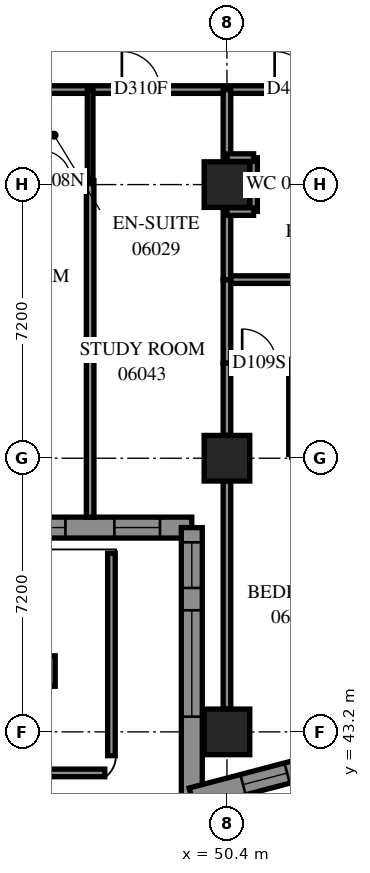
"""IFC4 building model, lengths in metres.
Left out: names, types, materials, properties, quantities, classifications, styles, units other than length and angle.
Written with IfcOpenShell. Run it as: python <this file> out.ifc"""

import sys

from ifc_helpers import new_model, si_unit, direction, frame, frame_2d, origin, origin_2d, place, context, subcontext, project, spatial, polyline, rectangle, outline, extrude, element, fill, save


model = new_model("IFC4")
c1 = context("Model", 3, precision=1e-05, world=origin(), true_north=direction((0.0, 1.0)))
c2 = subcontext(c1, "Body", "Model", "MODEL_VIEW")
j1 = project(units=[si_unit("LENGTHUNIT", "METRE"), si_unit("PLANEANGLEUNIT", "RADIAN")], contexts=[c1])
p1 = place(None, origin())
s1 = spatial("IfcSite", under=j1, at=p1, CompositionType="ELEMENT")
p2 = place(p1, origin())
s2 = spatial("IfcBuilding", under=s1, at=p2, CompositionType="ELEMENT")
p3 = place(p2, frame((0.0, 0.0, 27.0)))
s3 = spatial("IfcBuildingStorey", under=s2, at=p3, CompositionType="ELEMENT", Elevation=27.0)
for number, where, z_axis, x_axis in (
    (1, (50.4, 43.2, 0.0), (0.0, 0.0, 1.0), (1.0, 0.0, 0.0)),
    (2, (50.4, 50.4, 0.0), (0.0, 0.0, 1.0), (1.0, 0.0, 0.0)),
    (3, (50.4, 57.6, 0.0), (0.0, 0.0, 1.0), (1.0, 0.0, 0.0)),
):
    element("IfcColumn", number, at=place(p3, frame(where, z_axis=z_axis, x_axis=x_axis)), inside=s3, PredefinedType="COLUMN", context=c2, shape_type="SweptSolid", body=[
        extrude(rectangle(XDim=1.2, YDim=1.2, at=origin_2d()), origin(), (0.0, 0.0, 1.0), 3.1),
    ])
p4 = place(p3, frame((35.075, 48.575, 0.0), z_axis=(0.0, 0.0, 1.0), x_axis=(1.0, 0.0, 0.0)))
e4 = element("IfcWall", 4, at=p4, inside=s3, PredefinedType="SOLIDWALL", context=c2, shape_type="SweptSolid", body=[
    extrude(outline(polyline([(-0.275, -0.275), (14.125, -0.275), (14.675, 0.275), (0.275, 0.275), (-0.275, -0.275)])), origin(), (0.0, 0.0, 1.0), 3.1),
])
p5 = place(p4, frame((1.325, 0.0, 0.5)))
e5 = element("IfcOpeningElement", 5, at=p5, cuts=e4, PredefinedType="OPENING", context=c2, shape_type="SweptSolid", body=[
    extrude(rectangle(XDim=2.8, YDim=2.45, at=frame_2d((1.4, 1.225))), frame((0.0, 0.285, 0.0), z_axis=(0.0, -1.0, 0.0), x_axis=(1.0, 0.0, 0.0)), (0.0, 0.0, 1.0), 0.57),
])
p6 = place(p4, frame((4.925, 0.0, 0.5)))
e6 = element("IfcOpeningElement", 6, at=p6, cuts=e4, PredefinedType="OPENING", context=c2, shape_type="SweptSolid", body=[
    extrude(rectangle(XDim=2.8, YDim=2.45, at=frame_2d((1.4, 1.225))), frame((0.0, 0.285, 0.0), z_axis=(0.0, -1.0, 0.0), x_axis=(1.0, 0.0, 0.0)), (0.0, 0.0, 1.0), 0.57),
])
p7 = place(p4, frame((8.275, 0.0, 0.5)))
e7 = element("IfcOpeningElement", 7, at=p7, cuts=e4, PredefinedType="OPENING", context=c2, shape_type="SweptSolid", body=[
    extrude(rectangle(XDim=2.8, YDim=2.45, at=frame_2d((1.4, 1.225))), frame((0.0, 0.285, 0.0), z_axis=(0.0, -1.0, 0.0), x_axis=(1.0, 0.0, 0.0)), (0.0, 0.0, 1.0), 0.57),
])
p8 = place(p4, frame((12.363, 0.0, 0.5)))
e8 = element("IfcOpeningElement", 8, at=p8, cuts=e4, PredefinedType="OPENING", context=c2, shape_type="SweptSolid", body=[
    extrude(rectangle(XDim=1.2, YDim=2.45, at=frame_2d((0.6, 1.225))), frame((0.0, 0.285, 0.0), z_axis=(0.0, -1.0, 0.0), x_axis=(1.0, 0.0, 0.0)), (0.0, 0.0, 1.0), 0.57),
])
p9 = place(p3, frame((49.475, 48.575, 0.0), z_axis=(0.0, 0.0, 1.0), x_axis=(0.0, -1.0, 0.0)))
e9 = element("IfcWall", 9, at=p9, inside=s3, PredefinedType="SOLIDWALL", context=c2, shape_type="SweptSolid", body=[
    extrude(outline(polyline([(0.275, -0.275), (7.475, -0.275), (6.762, 0.275), (-0.275, 0.275), (0.275, -0.275)])), origin(), (0.0, 0.0, 1.0), 3.1),
])
p10 = place(p9, frame((2.175, 0.0, 0.5)))
e10 = element("IfcOpeningElement", 10, at=p10, cuts=e9, PredefinedType="OPENING", context=c2, shape_type="SweptSolid", body=[
    extrude(rectangle(XDim=2.8, YDim=2.45, at=frame_2d((1.4, 1.225))), frame((0.0, 0.285, 0.0), z_axis=(0.0, -1.0, 0.0), x_axis=(1.0, 0.0, 0.0)), (0.0, 0.0, 1.0), 0.57),
])
p11 = place(p9, frame((0.388, 0.0, 0.5)))
e11 = element("IfcOpeningElement", 11, at=p11, cuts=e9, PredefinedType="OPENING", context=c2, shape_type="SweptSolid", body=[
    extrude(rectangle(XDim=1.2, YDim=2.45, at=frame_2d((0.6, 1.225))), frame((0.0, 0.285, 0.0), z_axis=(0.0, -1.0, 0.0), x_axis=(1.0, 0.0, 0.0)), (0.0, 0.0, 1.0), 0.57),
])
p12 = place(p3, frame((49.475, 41.457, 0.0), z_axis=(0.0, 0.0, 1.0), x_axis=(0.9671322544, 0.2542738729, 0.0)))
e12 = element("IfcWall", 12, at=p12, inside=s3, PredefinedType="SOLIDWALL", context=c2, shape_type="SweptSolid", body=[
    extrude(outline(polyline([(-0.357, -0.275), (3.183, -0.275), (3.278, 0.275), (0.357, 0.275), (-0.357, -0.275)])), origin(), (0.0, 0.0, 1.0), 3.1),
])
p13 = place(p12, frame((1.393, 0.0, 0.5)))
e13 = element("IfcOpeningElement", 13, at=p13, cuts=e12, PredefinedType="OPENING", context=c2, shape_type="SweptSolid", body=[
    extrude(rectangle(XDim=1.2, YDim=2.45, at=frame_2d((0.6, 1.225))), frame((0.0, 0.285, 0.0), z_axis=(0.0, -1.0, 0.0), x_axis=(1.0, 0.0, 0.0)), (0.0, 0.0, 1.0), 0.57),
])
p14 = place(p3, frame((28.8, 60.1, 0.0), z_axis=(0.0, 0.0, 1.0), x_axis=(1.0, 0.0, 0.0)))
e14 = element("IfcWall", 14, at=p14, inside=s3, PredefinedType="PARTITIONING", context=c2, shape_type="SweptSolid", body=[
    extrude(rectangle(XDim=24.1, YDim=0.2, at=frame_2d((12.05, 0.0))), origin(), (0.0, 0.0, 1.0), 3.1),
])
p15 = place(p14, frame((4.125, 0.0, 0.0)))
e15 = element("IfcOpeningElement", 15, at=p15, cuts=e14, PredefinedType="OPENING", context=c2, shape_type="SweptSolid", body=[
    extrude(rectangle(XDim=1.0, YDim=2.1, at=frame_2d((0.5, 1.05))), frame((0.0, 0.11, 0.0), z_axis=(0.0, -1.0, 0.0), x_axis=(1.0, 0.0, 0.0)), (0.0, 0.0, 1.0), 0.22),
])
p16 = place(p14, frame((11.62, 0.0, 0.0)))
e16 = element("IfcOpeningElement", 16, at=p16, cuts=e14, PredefinedType="OPENING", context=c2, shape_type="SweptSolid", body=[
    extrude(rectangle(XDim=0.9, YDim=2.1, at=frame_2d((0.45, 1.05))), frame((0.0, 0.11, 0.0), z_axis=(0.0, -1.0, 0.0), x_axis=(1.0, 0.0, 0.0)), (0.0, 0.0, 1.0), 0.22),
])
p17 = place(p14, frame((14.8, 0.0, 0.0)))
e17 = element("IfcOpeningElement", 17, at=p17, cuts=e14, PredefinedType="OPENING", context=c2, shape_type="SweptSolid", body=[
    extrude(rectangle(XDim=0.9, YDim=2.1, at=frame_2d((0.45, 1.05))), frame((0.0, 0.11, 0.0), z_axis=(0.0, -1.0, 0.0), x_axis=(1.0, 0.0, 0.0)), (0.0, 0.0, 1.0), 0.22),
])
p18 = place(p14, frame((18.835, 0.0, 0.0)))
e18 = element("IfcOpeningElement", 18, at=p18, cuts=e14, PredefinedType="OPENING", context=c2, shape_type="SweptSolid", body=[
    extrude(rectangle(XDim=1.0, YDim=2.1, at=frame_2d((0.5, 1.05))), frame((0.0, 0.11, 0.0), z_axis=(0.0, -1.0, 0.0), x_axis=(1.0, 0.0, 0.0)), (0.0, 0.0, 1.0), 0.22),
])
p19 = place(p14, frame((22.854, 0.0, 0.0)))
e19 = element("IfcOpeningElement", 19, at=p19, cuts=e14, PredefinedType="OPENING", context=c2, shape_type="SweptSolid", body=[
    extrude(rectangle(XDim=1.0, YDim=2.1, at=frame_2d((0.5, 1.05))), frame((0.0, 0.11, 0.0), z_axis=(0.0, -1.0, 0.0), x_axis=(1.0, 0.0, 0.0)), (0.0, 0.0, 1.0), 0.22),
])
p20 = place(p3, frame((46.8, 48.85, 0.0), z_axis=(0.0, 0.0, 1.0), x_axis=(0.0, 1.0, 0.0)))
e20 = element("IfcWall", 20, at=p20, inside=s3, PredefinedType="PARTITIONING", context=c2, shape_type="SweptSolid", body=[
    extrude(rectangle(XDim=8.85, YDim=0.2, at=frame_2d((4.425, 0.0))), origin(), (0.0, 0.0, 1.0), 3.1),
])
p21 = place(p3, frame((50.4, 43.8, 0.0), z_axis=(0.0, 0.0, 1.0), x_axis=(0.0, 1.0, 0.0)))
e21 = element("IfcWall", 21, at=p21, inside=s3, PredefinedType="PARTITIONING", context=c2, shape_type="SweptSolid", body=[
    extrude(rectangle(XDim=6.0, YDim=0.2, at=frame_2d((3.0, 0.0))), origin(), (0.0, 0.0, 1.0), 2.6),
])
p22 = place(p3, frame((50.4, 52.9, 0.0), z_axis=(0.0, 0.0, 1.0), x_axis=(1.0, 0.0, 0.0)))
e22 = element("IfcWall", 22, at=p22, inside=s3, PredefinedType="PARTITIONING", context=c2, shape_type="SweptSolid", body=[
    extrude(rectangle(XDim=4.1, YDim=0.2, at=frame_2d((2.05, 0.0))), origin(), (0.0, 0.0, 1.0), 3.1),
])
p23 = place(p22, frame((0.4, 0.0, 0.0)))
e23 = element("IfcOpeningElement", 23, at=p23, cuts=e22, PredefinedType="OPENING", context=c2, shape_type="SweptSolid", body=[
    extrude(rectangle(XDim=0.9, YDim=2.1, at=frame_2d((0.45, 1.05))), frame((0.0, 0.11, 0.0), z_axis=(0.0, -1.0, 0.0), x_axis=(1.0, 0.0, 0.0)), (0.0, 0.0, 1.0), 0.22),
])
p24 = place(p3, frame((50.4, 55.1, 0.0), z_axis=(0.0, 0.0, 1.0), x_axis=(1.0, 0.0, 0.0)))
e24 = element("IfcWall", 24, at=p24, inside=s3, PredefinedType="PARTITIONING", context=c2, shape_type="SweptSolid", body=[
    extrude(rectangle(XDim=2.5, YDim=0.2, at=frame_2d((1.25, 0.0))), origin(), (0.0, 0.0, 1.0), 3.1),
])
for number, where, z_axis, x_axis in (
    (25, (46.8, 57.7, 0.0), (0.0, 0.0, 1.0), (0.0, 1.0, 0.0)),
    (26, (52.1, 50.5, 0.0), (0.0, 0.0, 1.0), (0.0, 1.0, 0.0)),
):
    element("IfcWall", number, at=place(p3, frame(where, z_axis=z_axis, x_axis=x_axis)), inside=s3, PredefinedType="PARTITIONING", context=c2, shape_type="SweptSolid", body=[
        extrude(rectangle(XDim=2.4, YDim=0.15, at=frame_2d((1.2, 0.0))), origin(), (0.0, 0.0, 1.0), 3.1),
    ])
p25 = place(p3, frame((50.4, 52.9, 0.0), z_axis=(0.0, 0.0, 1.0), x_axis=(0.0, 1.0, 0.0)))
e27 = element("IfcWall", 27, at=p25, inside=s3, PredefinedType="PARTITIONING", context=c2, shape_type="SweptSolid", body=[
    extrude(rectangle(XDim=2.2, YDim=0.2, at=frame_2d((1.1, 0.0))), origin(), (0.0, 0.0, 1.0), 3.1),
])
p26 = place(p3, frame((44.9, 57.7, 0.0), z_axis=(0.0, 0.0, 1.0), x_axis=(1.0, 0.0, 0.0)))
e28 = element("IfcWall", 28, at=p26, inside=s3, PredefinedType="PARTITIONING", context=c2, shape_type="SweptSolid", body=[
    extrude(rectangle(XDim=1.9, YDim=0.15, at=frame_2d((0.95, 0.0))), origin(), (0.0, 0.0, 1.0), 3.1),
])
p27 = place(p26, frame((0.598, 0.0, 0.0)))
e29 = element("IfcOpeningElement", 29, at=p27, cuts=e28, PredefinedType="OPENING", context=c2, shape_type="SweptSolid", body=[
    extrude(rectangle(XDim=0.8, YDim=2.1, at=frame_2d((0.4, 1.05))), frame((0.0, 0.085, 0.0), z_axis=(0.0, -1.0, 0.0), x_axis=(1.0, 0.0, 0.0)), (0.0, 0.0, 1.0), 0.17),
])
p28 = place(p3, frame((50.4, 51.0, 0.0), z_axis=(0.0, 0.0, 1.0), x_axis=(0.0, 1.0, 0.0)))
e30 = element("IfcWall", 30, at=p28, inside=s3, PredefinedType="PARTITIONING", context=c2, shape_type="SweptSolid", body=[
    extrude(rectangle(XDim=1.9, YDim=0.2, at=frame_2d((0.95, 0.0))), origin(), (0.0, 0.0, 1.0), 3.1),
])
for number, where, z_axis, x_axis in (
    (31, (50.4, 58.306, 0.0), (0.0, 0.0, 1.0), (0.0, 1.0, 0.0)),
    (32, (50.4, 55.1, 0.0), (0.0, 0.0, 1.0), (0.0, 1.0, 0.0)),
):
    element("IfcWall", number, at=place(p3, frame(where, z_axis=z_axis, x_axis=x_axis)), inside=s3, PredefinedType="PARTITIONING", context=c2, shape_type="SweptSolid", body=[
        extrude(rectangle(XDim=1.794, YDim=0.2, at=frame_2d((0.897, 0.0))), origin(), (0.0, 0.0, 1.0), 3.1),
    ])
p29 = place(p3, frame((51.1, 56.894, 0.0), z_axis=(0.0, 0.0, 1.0), x_axis=(0.0, 1.0, 0.0)))
e33 = element("IfcWall", 33, at=p29, inside=s3, PredefinedType="PARTITIONING", context=c2, shape_type="SweptSolid", body=[
    extrude(rectangle(XDim=1.412, YDim=0.2, at=frame_2d((0.706, 0.0))), origin(), (0.0, 0.0, 1.0), 3.1),
])
for number, where, z_axis, x_axis in (
    (34, (50.4, 58.31, 0.0), (0.0, 0.0, 1.0), (1.0, 0.0, 0.0)),
    (35, (50.4, 56.89, 0.0), (0.0, 0.0, 1.0), (1.0, 0.0, 0.0)),
):
    element("IfcWall", number, at=place(p3, frame(where, z_axis=z_axis, x_axis=x_axis)), inside=s3, PredefinedType="PARTITIONING", context=c2, shape_type="SweptSolid", body=[
        extrude(rectangle(XDim=0.7, YDim=0.2, at=frame_2d((0.35, 0.0))), origin(), (0.0, 0.0, 1.0), 3.1),
    ])
p30 = place(p3, frame((47.36, 47.9, 0.0), z_axis=(0.0, 0.0, 1.0), x_axis=(0.0, -1.0, 0.0)))
e36 = element("IfcWall", 36, at=p30, inside=s3, PredefinedType="PARAPET", context=c2, shape_type="SweptSolid", body=[
    extrude(rectangle(XDim=5.326, YDim=0.2, at=frame_2d((2.663, 0.0))), origin(), (0.0, 0.0, 1.0), 0.9),
])
p31 = place(p3, frame((47.185, 42.12, 0.0), z_axis=(0.0, 0.0, 1.0), x_axis=(-1.0, 0.0, 0.0)))
e37 = element("IfcWall", 37, at=p31, inside=s3, PredefinedType="PARAPET", context=c2, shape_type="SweptSolid", body=[
    extrude(rectangle(XDim=47.02, YDim=0.2, at=frame_2d((23.51, 0.0))), origin(), (0.0, 0.0, 1.0), 0.9),
])
p32 = place(p3, frame((1.6, 44.8, 0.0), z_axis=(0.0, 0.0, 1.0), x_axis=(1.0, 0.0, 0.0)))
e38 = element("IfcWall", 38, at=p32, inside=s3, PredefinedType="SOLIDWALL", context=c2, shape_type="SweptSolid", body=[
    extrude(rectangle(XDim=44.28, YDim=0.8, at=frame_2d((22.14, 0.0))), origin(), (0.0, 0.0, 1.0), 0.6),
])
p33 = place(p7, origin())
e39 = element("IfcWindow", 39, at=p33, inside=s3, PartitioningType="SINGLE_PANEL", PredefinedType="WINDOW", context=c2, shape_type="SweptSolid", body=[
    extrude(rectangle(XDim=2.8, YDim=2.45, at=frame_2d((1.4, 1.225))), frame((0.0, 0.155, 0.0), z_axis=(0.0, -1.0, 0.0), x_axis=(1.0, 0.0, 0.0)), (0.0, 0.0, 1.0), 0.06),
])
fill(e7, e39)
p34 = place(p8, origin())
e40 = element("IfcWindow", 40, at=p34, inside=s3, PartitioningType="SINGLE_PANEL", PredefinedType="WINDOW", context=c2, shape_type="SweptSolid", body=[
    extrude(rectangle(XDim=1.2, YDim=2.45, at=frame_2d((0.6, 1.225))), frame((0.0, 0.155, 0.0), z_axis=(0.0, -1.0, 0.0), x_axis=(1.0, 0.0, 0.0)), (0.0, 0.0, 1.0), 0.06),
])
fill(e8, e40)
p35 = place(p10, origin())
e41 = element("IfcWindow", 41, at=p35, inside=s3, PartitioningType="SINGLE_PANEL", PredefinedType="WINDOW", context=c2, shape_type="SweptSolid", body=[
    extrude(rectangle(XDim=2.8, YDim=2.45, at=frame_2d((1.4, 1.225))), frame((0.0, 0.155, 0.0), z_axis=(0.0, -1.0, 0.0), x_axis=(1.0, 0.0, 0.0)), (0.0, 0.0, 1.0), 0.06),
])
fill(e10, e41)
p36 = place(p11, origin())
e42 = element("IfcWindow", 42, at=p36, inside=s3, PartitioningType="SINGLE_PANEL", PredefinedType="WINDOW", context=c2, shape_type="SweptSolid", body=[
    extrude(rectangle(XDim=1.2, YDim=2.45, at=frame_2d((0.6, 1.225))), frame((0.0, 0.155, 0.0), z_axis=(0.0, -1.0, 0.0), x_axis=(1.0, 0.0, 0.0)), (0.0, 0.0, 1.0), 0.06),
])
fill(e11, e42)
p37 = place(p13, origin())
e43 = element("IfcWindow", 43, at=p37, inside=s3, PartitioningType="SINGLE_PANEL", PredefinedType="WINDOW", context=c2, shape_type="SweptSolid", body=[
    extrude(rectangle(XDim=1.2, YDim=2.45, at=frame_2d((0.6, 1.225))), frame((0.0, 0.155, 0.0), z_axis=(0.0, -1.0, 0.0), x_axis=(1.0, 0.0, 0.0)), (0.0, 0.0, 1.0), 0.06),
])
fill(e13, e43)
p38 = place(p27, origin())
e44 = element("IfcDoor", 44, at=p38, inside=s3, OperationType="SINGLE_SWING_RIGHT", PredefinedType="DOOR", context=c2, shape_type="SweptSolid", body=[
    extrude(rectangle(XDim=0.8, YDim=2.1, at=frame_2d((0.4, 1.05))), frame((0.0, 0.025, 0.0), z_axis=(0.0, -1.0, 0.0), x_axis=(1.0, 0.0, 0.0)), (0.0, 0.0, 1.0), 0.05),
])
fill(e29, e44)
p39 = place(p18, origin())
e45 = element("IfcDoor", 45, at=p39, inside=s3, OperationType="SINGLE_SWING_RIGHT", PredefinedType="DOOR", context=c2, shape_type="SweptSolid", body=[
    extrude(rectangle(XDim=1.0, YDim=2.1, at=frame_2d((0.5, 1.05))), frame((0.0, 0.025, 0.0), z_axis=(0.0, -1.0, 0.0), x_axis=(1.0, 0.0, 0.0)), (0.0, 0.0, 1.0), 0.05),
])
fill(e18, e45)
p40 = place(p19, origin())
e46 = element("IfcDoor", 46, at=p40, inside=s3, OperationType="SINGLE_SWING_LEFT", PredefinedType="DOOR", context=c2, shape_type="SweptSolid", body=[
    extrude(rectangle(XDim=1.0, YDim=2.1, at=frame_2d((0.5, 1.05))), frame((0.0, 0.025, 0.0), z_axis=(0.0, -1.0, 0.0), x_axis=(1.0, 0.0, 0.0)), (0.0, 0.0, 1.0), 0.05),
])
fill(e19, e46)
p41 = place(p23, origin())
e47 = element("IfcDoor", 47, at=p41, inside=s3, OperationType="SINGLE_SWING_LEFT", PredefinedType="DOOR", context=c2, shape_type="SweptSolid", body=[
    extrude(rectangle(XDim=0.9, YDim=2.1, at=frame_2d((0.45, 1.05))), frame((0.0, 0.025, 0.0), z_axis=(0.0, -1.0, 0.0), x_axis=(1.0, 0.0, 0.0)), (0.0, 0.0, 1.0), 0.05),
])
fill(e23, e47)
save(model, sys.argv[1])
